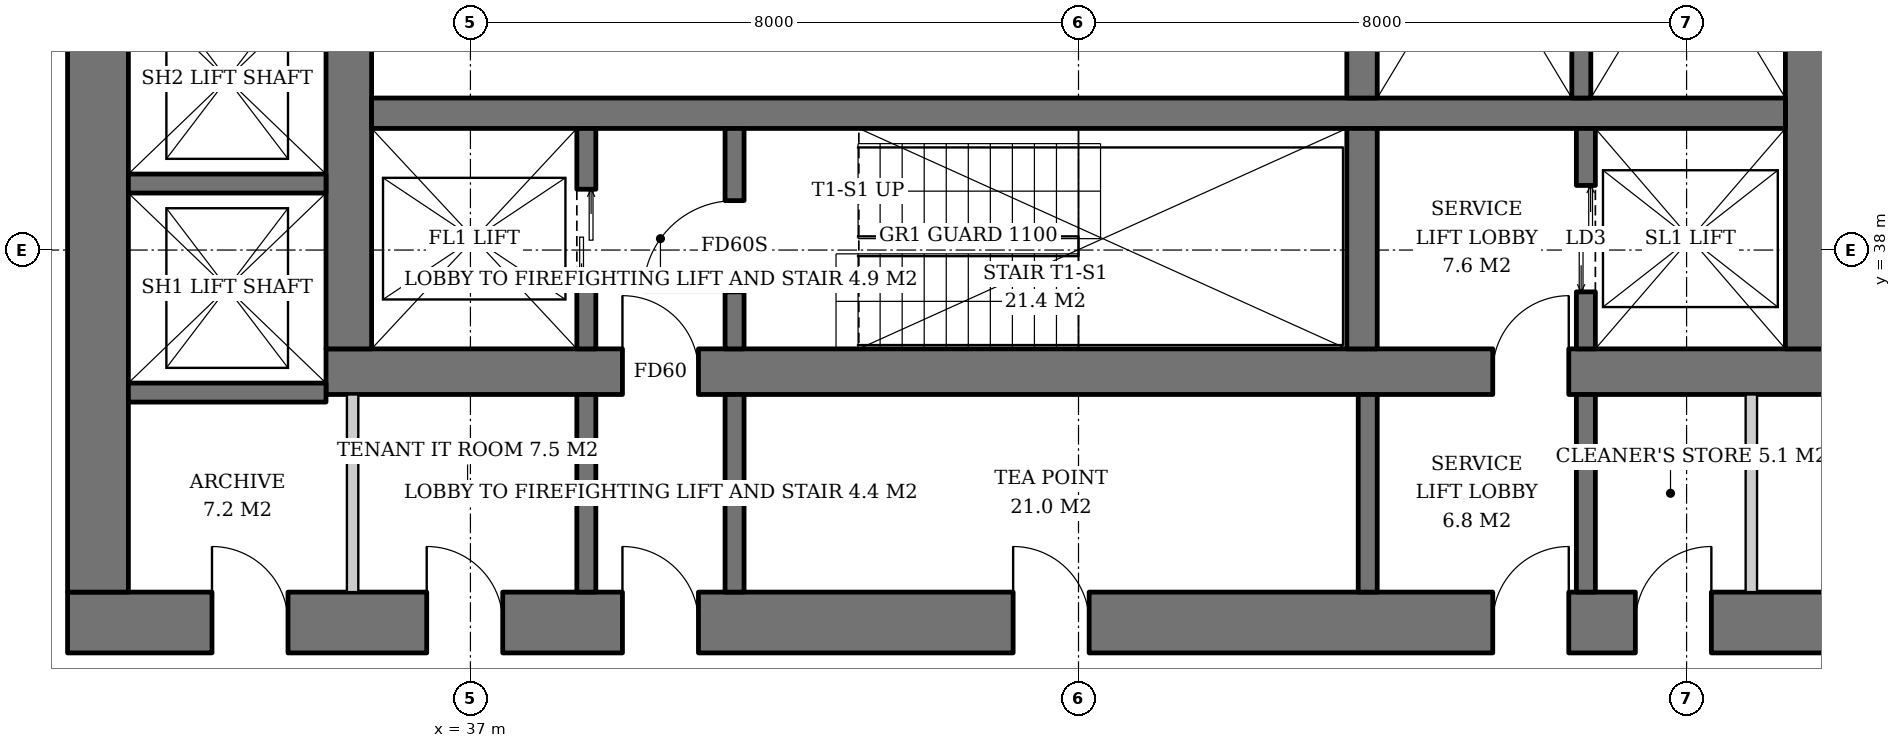
"""IFC4 building model, lengths in metres.
Left out: names, types, materials, properties, quantities, classifications, styles, units other than length and angle.
Written with IfcOpenShell. Run it as: python <this file> out.ifc"""

import sys

from ifc_helpers import new_model, si_unit, direction, frame, frame_2d, origin, place, context, subcontext, project, spatial, rectangle, extrude, element, fill, save


model = new_model("IFC4")
c1 = context("Model", 3, precision=1e-05, world=origin(), true_north=direction((0.0, 1.0)))
c2 = subcontext(c1, "Body", "Model", "MODEL_VIEW")
j1 = project(units=[si_unit("LENGTHUNIT", "METRE"), si_unit("PLANEANGLEUNIT", "RADIAN")], contexts=[c1])
p1 = place(None, origin())
s1 = spatial("IfcSite", under=j1, at=p1, CompositionType="ELEMENT")
p2 = place(p1, origin())
s2 = spatial("IfcBuilding", under=s1, at=p2, CompositionType="ELEMENT")
p3 = place(p2, frame((0.0, 0.0, 62.8)))
s3 = spatial("IfcBuildingStorey", under=s2, at=p3, CompositionType="ELEMENT", Elevation=62.8)
p4 = place(p3, frame((35.1, 36.4, 0.0), z_axis=(0.0, 0.0, 1.0), x_axis=(1.0, 0.0, 0.0)))
e1 = element("IfcWall", 1, at=p4, inside=s3, PredefinedType="SHEAR", context=c2, shape_type="SweptSolid", body=[
    extrude(rectangle(XDim=19.8, YDim=0.6, at=frame_2d((9.9, 0.0))), origin(), (0.0, 0.0, 1.0), 3.8),
])
p5 = place(p4, frame((3.9, 0.0, 0.0)))
e2 = element("IfcOpeningElement", 2, at=p5, cuts=e1, PredefinedType="OPENING", context=c2, shape_type="SweptSolid", body=[
    extrude(rectangle(XDim=1.0, YDim=2.1, at=frame_2d((0.5, 1.05))), frame((0.0, 0.31, 0.0), z_axis=(0.0, -1.0, 0.0), x_axis=(1.0, 0.0, 0.0)), (0.0, 0.0, 1.0), 0.62),
])
p6 = place(p4, frame((15.35, 0.0, 0.0)))
e3 = element("IfcOpeningElement", 3, at=p6, cuts=e1, PredefinedType="OPENING", context=c2, shape_type="SweptSolid", body=[
    extrude(rectangle(XDim=1.0, YDim=2.1, at=frame_2d((0.5, 1.05))), frame((0.0, 0.31, 0.0), z_axis=(0.0, -1.0, 0.0), x_axis=(1.0, 0.0, 0.0)), (0.0, 0.0, 1.0), 0.62),
])
p7 = place(p3, frame((35.4, 36.7, 0.0), z_axis=(0.0, 0.0, 1.0), x_axis=(0.0, 1.0, 0.0)))
e4 = element("IfcWall", 4, at=p7, inside=s3, PredefinedType="SHEAR", context=c2, shape_type="SweptSolid", body=[
    extrude(rectangle(XDim=18.6, YDim=0.6, at=frame_2d((9.3, 0.0))), origin(), (0.0, 0.0, 1.0), 3.8),
])
p8 = place(p7, frame((8.4, 0.0, 0.0)))
e5 = element("IfcOpeningElement", 5, at=p8, cuts=e4, PredefinedType="OPENING", context=c2, shape_type="SweptSolid", body=[
    extrude(rectangle(XDim=1.8, YDim=2.4, at=frame_2d((0.9, 1.2))), frame((0.0, 0.31, 0.0), z_axis=(0.0, -1.0, 0.0), x_axis=(1.0, 0.0, 0.0)), (0.0, 0.0, 1.0), 0.62),
])
p9 = place(p3, frame((54.6, 36.7, 0.0), z_axis=(0.0, 0.0, 1.0), x_axis=(0.0, 1.0, 0.0)))
e6 = element("IfcWall", 6, at=p9, inside=s3, PredefinedType="SHEAR", context=c2, shape_type="SweptSolid", body=[
    extrude(rectangle(XDim=18.6, YDim=0.6, at=frame_2d((9.3, 0.0))), origin(), (0.0, 0.0, 1.0), 3.8),
])
p10 = place(p9, frame((8.4, 0.0, 0.0)))
e7 = element("IfcOpeningElement", 7, at=p10, cuts=e6, PredefinedType="OPENING", context=c2, shape_type="SweptSolid", body=[
    extrude(rectangle(XDim=1.8, YDim=2.4, at=frame_2d((0.9, 1.2))), frame((0.0, 0.31, 0.0), z_axis=(0.0, -1.0, 0.0), x_axis=(1.0, 0.0, 0.0)), (0.0, 0.0, 1.0), 0.62),
])
p11 = place(p3, frame((31.7, 33.1, 0.0), z_axis=(0.0, 0.0, 1.0), x_axis=(1.0, 0.0, 0.0)))
e8 = element("IfcWall", 8, at=p11, inside=s3, PredefinedType="SHEAR", context=c2, shape_type="SweptSolid", body=[
    extrude(rectangle(XDim=26.6, YDim=0.8, at=frame_2d((13.3, 0.0))), origin(), (0.0, 0.0, 1.0), 3.8),
])
p12 = place(p11, frame((7.3, 0.0, 0.0)))
e9 = element("IfcOpeningElement", 9, at=p12, cuts=e8, PredefinedType="OPENING", context=c2, shape_type="SweptSolid", body=[
    extrude(rectangle(XDim=1.0, YDim=2.1, at=frame_2d((0.5, 1.05))), frame((0.0, 0.41, 0.0), z_axis=(0.0, -1.0, 0.0), x_axis=(1.0, 0.0, 0.0)), (0.0, 0.0, 1.0), 0.82),
])
p13 = place(p11, frame((18.75, 0.0, 0.0)))
e10 = element("IfcOpeningElement", 10, at=p13, cuts=e8, PredefinedType="OPENING", context=c2, shape_type="SweptSolid", body=[
    extrude(rectangle(XDim=1.0, YDim=2.1, at=frame_2d((0.5, 1.05))), frame((0.0, 0.41, 0.0), z_axis=(0.0, -1.0, 0.0), x_axis=(1.0, 0.0, 0.0)), (0.0, 0.0, 1.0), 0.82),
])
p14 = place(p11, frame((1.9, 0.0, 0.0)))
e11 = element("IfcOpeningElement", 11, at=p14, cuts=e8, PredefinedType="OPENING", context=c2, shape_type="SweptSolid", body=[
    extrude(rectangle(XDim=1.0, YDim=2.1, at=frame_2d((0.5, 1.05))), frame((0.0, 0.41, 0.0), z_axis=(0.0, -1.0, 0.0), x_axis=(1.0, 0.0, 0.0)), (0.0, 0.0, 1.0), 0.82),
])
p15 = place(p11, frame((4.725, 0.0, 0.0)))
e12 = element("IfcOpeningElement", 12, at=p15, cuts=e8, PredefinedType="OPENING", context=c2, shape_type="SweptSolid", body=[
    extrude(rectangle(XDim=1.0, YDim=2.1, at=frame_2d((0.5, 1.05))), frame((0.0, 0.41, 0.0), z_axis=(0.0, -1.0, 0.0), x_axis=(1.0, 0.0, 0.0)), (0.0, 0.0, 1.0), 0.82),
])
p16 = place(p11, frame((12.44, 0.0, 0.0)))
e13 = element("IfcOpeningElement", 13, at=p16, cuts=e8, PredefinedType="OPENING", context=c2, shape_type="SweptSolid", body=[
    extrude(rectangle(XDim=1.0, YDim=2.1, at=frame_2d((0.5, 1.05))), frame((0.0, 0.41, 0.0), z_axis=(0.0, -1.0, 0.0), x_axis=(1.0, 0.0, 0.0)), (0.0, 0.0, 1.0), 0.82),
])
p17 = place(p11, frame((20.626, 0.0, 0.0)))
e14 = element("IfcOpeningElement", 14, at=p17, cuts=e8, PredefinedType="OPENING", context=c2, shape_type="SweptSolid", body=[
    extrude(rectangle(XDim=1.0, YDim=2.1, at=frame_2d((0.5, 1.05))), frame((0.0, 0.41, 0.0), z_axis=(0.0, -1.0, 0.0), x_axis=(1.0, 0.0, 0.0)), (0.0, 0.0, 1.0), 0.82),
])
p18 = place(p11, frame((23.476, 0.0, 0.0)))
e15 = element("IfcOpeningElement", 15, at=p18, cuts=e8, PredefinedType="OPENING", context=c2, shape_type="SweptSolid", body=[
    extrude(rectangle(XDim=1.0, YDim=2.1, at=frame_2d((0.5, 1.05))), frame((0.0, 0.41, 0.0), z_axis=(0.0, -1.0, 0.0), x_axis=(1.0, 0.0, 0.0)), (0.0, 0.0, 1.0), 0.82),
])
p19 = place(p3, frame((32.1, 33.5, 0.0), z_axis=(0.0, 0.0, 1.0), x_axis=(0.0, 1.0, 0.0)))
e16 = element("IfcWall", 16, at=p19, inside=s3, PredefinedType="SHEAR", context=c2, shape_type="SweptSolid", body=[
    extrude(rectangle(XDim=25.0, YDim=0.8, at=frame_2d((12.5, 0.0))), origin(), (0.0, 0.0, 1.0), 3.8),
])
p20 = place(p19, frame((11.6, 0.0, 0.0)))
e17 = element("IfcOpeningElement", 17, at=p20, cuts=e16, PredefinedType="OPENING", context=c2, shape_type="SweptSolid", body=[
    extrude(rectangle(XDim=1.8, YDim=2.4, at=frame_2d((0.9, 1.2))), frame((0.0, 0.41, 0.0), z_axis=(0.0, -1.0, 0.0), x_axis=(1.0, 0.0, 0.0)), (0.0, 0.0, 1.0), 0.82),
])
p21 = place(p3, frame((35.7, 39.8, 0.0), z_axis=(0.0, 0.0, 1.0), x_axis=(1.0, 0.0, 0.0)))
e18 = element("IfcWall", 18, at=p21, inside=s3, PredefinedType="SHEAR", context=c2, shape_type="SweptSolid", body=[
    extrude(rectangle(XDim=18.6, YDim=0.4, at=frame_2d((9.3, 0.0))), origin(), (0.0, 0.0, 1.0), 3.8),
])
p22 = place(p3, frame((48.73, 36.7, 0.0), z_axis=(0.0, 0.0, 1.0), x_axis=(0.0, 1.0, 0.0)))
e19 = element("IfcWall", 19, at=p22, inside=s3, PredefinedType="SHEAR", context=c2, shape_type="SweptSolid", body=[
    extrude(rectangle(XDim=2.9, YDim=0.4, at=frame_2d((1.45, 0.0))), origin(), (0.0, 0.0, 1.0), 3.8),
])
p23 = place(p3, frame((48.73, 40.0, 0.0), z_axis=(0.0, 0.0, 1.0), x_axis=(0.0, 1.0, 0.0)))
e20 = element("IfcWall", 20, at=p23, inside=s3, PredefinedType="SHEAR", context=c2, shape_type="SweptSolid", body=[
    extrude(rectangle(XDim=12.0, YDim=0.4, at=frame_2d((6.0, 0.0))), origin(), (0.0, 0.0, 1.0), 3.8),
])
p24 = place(p3, frame((38.525, 36.7, 0.0), z_axis=(0.0, 0.0, 1.0), x_axis=(0.0, 1.0, 0.0)))
e21 = element("IfcWall", 21, at=p24, inside=s3, PredefinedType="SHEAR", context=c2, shape_type="SweptSolid", body=[
    extrude(rectangle(XDim=2.9, YDim=0.25, at=frame_2d((1.45, 0.0))), origin(), (0.0, 0.0, 1.0), 3.8),
])
p25 = place(p24, frame((0.8, 0.0, 0.0)))
e22 = element("IfcOpeningElement", 22, at=p25, cuts=e21, PredefinedType="OPENING", context=c2, shape_type="SweptSolid", body=[
    extrude(rectangle(XDim=1.3, YDim=2.2, at=frame_2d((0.65, 1.1))), frame((0.0, 0.135, 0.0), z_axis=(0.0, -1.0, 0.0), x_axis=(1.0, 0.0, 0.0)), (0.0, 0.0, 1.0), 0.27),
])
p26 = place(p3, frame((40.475, 36.7, 0.0), z_axis=(0.0, 0.0, 1.0), x_axis=(0.0, 1.0, 0.0)))
e23 = element("IfcWall", 23, at=p26, inside=s3, PredefinedType="SHEAR", context=c2, shape_type="SweptSolid", body=[
    extrude(rectangle(XDim=2.9, YDim=0.25, at=frame_2d((1.45, 0.0))), origin(), (0.0, 0.0, 1.0), 3.8),
])
p27 = place(p26, frame((0.75, 0.0, 0.0)))
e24 = element("IfcOpeningElement", 24, at=p27, cuts=e23, PredefinedType="OPENING", context=c2, shape_type="SweptSolid", body=[
    extrude(rectangle(XDim=1.2, YDim=2.1, at=frame_2d((0.6, 1.05))), frame((0.0, 0.135, 0.0), z_axis=(0.0, -1.0, 0.0), x_axis=(1.0, 0.0, 0.0)), (0.0, 0.0, 1.0), 0.27),
])
p28 = place(p3, frame((51.675, 36.7, 0.0), z_axis=(0.0, 0.0, 1.0), x_axis=(0.0, 1.0, 0.0)))
e25 = element("IfcWall", 25, at=p28, inside=s3, PredefinedType="SHEAR", context=c2, shape_type="SweptSolid", body=[
    extrude(rectangle(XDim=2.9, YDim=0.25, at=frame_2d((1.45, 0.0))), origin(), (0.0, 0.0, 1.0), 3.8),
])
p29 = place(p28, frame((0.75, 0.0, 0.0)))
e26 = element("IfcOpeningElement", 26, at=p29, cuts=e25, PredefinedType="OPENING", context=c2, shape_type="SweptSolid", body=[
    extrude(rectangle(XDim=1.4, YDim=2.4, at=frame_2d((0.7, 1.2))), frame((0.0, 0.135, 0.0), z_axis=(0.0, -1.0, 0.0), x_axis=(1.0, 0.0, 0.0)), (0.0, 0.0, 1.0), 0.27),
])
p30 = place(p3, frame((51.615, 44.25, 0.0), z_axis=(0.0, 0.0, 1.0), x_axis=(0.0, -1.0, 0.0)))
e27 = element("IfcWall", 27, at=p30, inside=s3, PredefinedType="SHEAR", context=c2, shape_type="SweptSolid", body=[
    extrude(rectangle(XDim=4.25, YDim=0.25, at=frame_2d((2.125, 0.0))), origin(), (0.0, 0.0, 1.0), 3.8),
])
for number, where, z_axis, x_axis in (
    (28, (32.5, 36.125, 0.0), (0.0, 0.0, 1.0), (1.0, 0.0, 0.0)),
    (29, (32.5, 38.875, 0.0), (0.0, 0.0, 1.0), (1.0, 0.0, 0.0)),
):
    element("IfcWall", number, at=place(p3, frame(where, z_axis=z_axis, x_axis=x_axis)), inside=s3, PredefinedType="SHEAR", context=c2, shape_type="SweptSolid", body=[
        extrude(rectangle(XDim=2.6, YDim=0.25, at=frame_2d((1.3, 0.0))), origin(), (0.0, 0.0, 1.0), 3.8),
    ])
for number, where, z_axis, x_axis in (
    (30, (38.525, 33.5, 0.0), (0.0, 0.0, 1.0), (0.0, 1.0, 0.0)),
    (31, (40.475, 33.5, 0.0), (0.0, 0.0, 1.0), (0.0, 1.0, 0.0)),
    (32, (48.805, 33.5, 0.0), (0.0, 0.0, 1.0), (0.0, 1.0, 0.0)),
    (33, (51.675, 33.5, 0.0), (0.0, 0.0, 1.0), (0.0, 1.0, 0.0)),
):
    element("IfcWall", number, at=place(p3, frame(where, z_axis=z_axis, x_axis=x_axis)), inside=s3, PredefinedType="SOLIDWALL", context=c2, shape_type="SweptSolid", body=[
        extrude(rectangle(XDim=2.6, YDim=0.25, at=frame_2d((1.3, 0.0))), origin(), (0.0, 0.0, 1.0), 3.62),
    ])
for number, where, z_axis, x_axis in (
    (34, (35.45, 33.5, 0.0), (0.0, 0.0, 1.0), (0.0, 1.0, 0.0)),
    (35, (53.852, 33.5, 0.0), (0.0, 0.0, 1.0), (0.0, 1.0, 0.0)),
):
    element("IfcWall", number, at=place(p3, frame(where, z_axis=z_axis, x_axis=x_axis)), inside=s3, PredefinedType="SOLIDWALL", context=c2, shape_type="SweptSolid", body=[
        extrude(rectangle(XDim=2.6, YDim=0.15, at=frame_2d((1.3, 0.0))), origin(), (0.0, 0.0, 1.0), 3.62),
    ])
p31 = place(p25, origin())
e36 = element("IfcDoor", 36, at=p31, inside=s3, OperationType="DOUBLE_DOOR_SLIDING", PredefinedType="DOOR", context=c2, shape_type="SweptSolid", body=[
    extrude(rectangle(XDim=1.3, YDim=2.2, at=frame_2d((0.65, 1.1))), frame((0.0, 0.025, 0.0), z_axis=(0.0, -1.0, 0.0), x_axis=(1.0, 0.0, 0.0)), (0.0, 0.0, 1.0), 0.05),
])
fill(e22, e36)
p32 = place(p27, origin())
e37 = element("IfcDoor", 37, at=p32, inside=s3, OperationType="SINGLE_SWING_LEFT", PredefinedType="DOOR", context=c2, shape_type="SweptSolid", body=[
    extrude(rectangle(XDim=1.2, YDim=2.1, at=frame_2d((0.6, 1.05))), frame((0.0, 0.025, 0.0), z_axis=(0.0, -1.0, 0.0), x_axis=(1.0, 0.0, 0.0)), (0.0, 0.0, 1.0), 0.05),
])
fill(e24, e37)
p33 = place(p29, origin())
e38 = element("IfcDoor", 38, at=p33, inside=s3, OperationType="DOUBLE_DOOR_SLIDING", PredefinedType="DOOR", context=c2, shape_type="SweptSolid", body=[
    extrude(rectangle(XDim=1.4, YDim=2.4, at=frame_2d((0.7, 1.2))), frame((0.0, 0.025, 0.0), z_axis=(0.0, -1.0, 0.0), x_axis=(1.0, 0.0, 0.0)), (0.0, 0.0, 1.0), 0.05),
])
fill(e26, e38)
p34 = place(p5, origin())
e39 = element("IfcDoor", 39, at=p34, inside=s3, OperationType="SINGLE_SWING_LEFT", PredefinedType="DOOR", context=c2, shape_type="SweptSolid", body=[
    extrude(rectangle(XDim=1.0, YDim=2.1, at=frame_2d((0.5, 1.05))), frame((0.0, 0.025, 0.0), z_axis=(0.0, -1.0, 0.0), x_axis=(1.0, 0.0, 0.0)), (0.0, 0.0, 1.0), 0.05),
])
fill(e2, e39)
p35 = place(p6, origin())
e40 = element("IfcDoor", 40, at=p35, inside=s3, OperationType="SINGLE_SWING_RIGHT", PredefinedType="DOOR", context=c2, shape_type="SweptSolid", body=[
    extrude(rectangle(XDim=1.0, YDim=2.1, at=frame_2d((0.5, 1.05))), frame((0.0, 0.025, 0.0), z_axis=(0.0, -1.0, 0.0), x_axis=(1.0, 0.0, 0.0)), (0.0, 0.0, 1.0), 0.05),
])
fill(e3, e40)
p36 = place(p12, origin())
e41 = element("IfcDoor", 41, at=p36, inside=s3, OperationType="SINGLE_SWING_LEFT", PredefinedType="DOOR", context=c2, shape_type="SweptSolid", body=[
    extrude(rectangle(XDim=1.0, YDim=2.1, at=frame_2d((0.5, 1.05))), frame((0.0, 0.025, 0.0), z_axis=(0.0, -1.0, 0.0), x_axis=(1.0, 0.0, 0.0)), (0.0, 0.0, 1.0), 0.05),
])
fill(e9, e41)
p37 = place(p13, origin())
e42 = element("IfcDoor", 42, at=p37, inside=s3, OperationType="SINGLE_SWING_RIGHT", PredefinedType="DOOR", context=c2, shape_type="SweptSolid", body=[
    extrude(rectangle(XDim=1.0, YDim=2.1, at=frame_2d((0.5, 1.05))), frame((0.0, 0.025, 0.0), z_axis=(0.0, -1.0, 0.0), x_axis=(1.0, 0.0, 0.0)), (0.0, 0.0, 1.0), 0.05),
])
fill(e10, e42)
p38 = place(p14, origin())
e43 = element("IfcDoor", 43, at=p38, inside=s3, OperationType="SINGLE_SWING_LEFT", PredefinedType="DOOR", context=c2, shape_type="SweptSolid", body=[
    extrude(rectangle(XDim=1.0, YDim=2.1, at=frame_2d((0.5, 1.05))), frame((0.0, 0.39, 0.0), z_axis=(0.0, -1.0, 0.0), x_axis=(1.0, 0.0, 0.0)), (0.0, 0.0, 1.0), 0.05),
])
fill(e11, e43)
p39 = place(p15, origin())
e44 = element("IfcDoor", 44, at=p39, inside=s3, OperationType="SINGLE_SWING_LEFT", PredefinedType="DOOR", context=c2, shape_type="SweptSolid", body=[
    extrude(rectangle(XDim=1.0, YDim=2.1, at=frame_2d((0.5, 1.05))), frame((0.0, 0.39, 0.0), z_axis=(0.0, -1.0, 0.0), x_axis=(1.0, 0.0, 0.0)), (0.0, 0.0, 1.0), 0.05),
])
fill(e12, e44)
p40 = place(p16, origin())
e45 = element("IfcDoor", 45, at=p40, inside=s3, OperationType="SINGLE_SWING_LEFT", PredefinedType="DOOR", context=c2, shape_type="SweptSolid", body=[
    extrude(rectangle(XDim=1.0, YDim=2.1, at=frame_2d((0.5, 1.05))), frame((0.0, 0.39, 0.0), z_axis=(0.0, -1.0, 0.0), x_axis=(1.0, 0.0, 0.0)), (0.0, 0.0, 1.0), 0.05),
])
fill(e13, e45)
p41 = place(p17, origin())
e46 = element("IfcDoor", 46, at=p41, inside=s3, OperationType="SINGLE_SWING_RIGHT", PredefinedType="DOOR", context=c2, shape_type="SweptSolid", body=[
    extrude(rectangle(XDim=1.0, YDim=2.1, at=frame_2d((0.5, 1.05))), frame((0.0, 0.39, 0.0), z_axis=(0.0, -1.0, 0.0), x_axis=(1.0, 0.0, 0.0)), (0.0, 0.0, 1.0), 0.05),
])
fill(e14, e46)
save(model, sys.argv[1])
